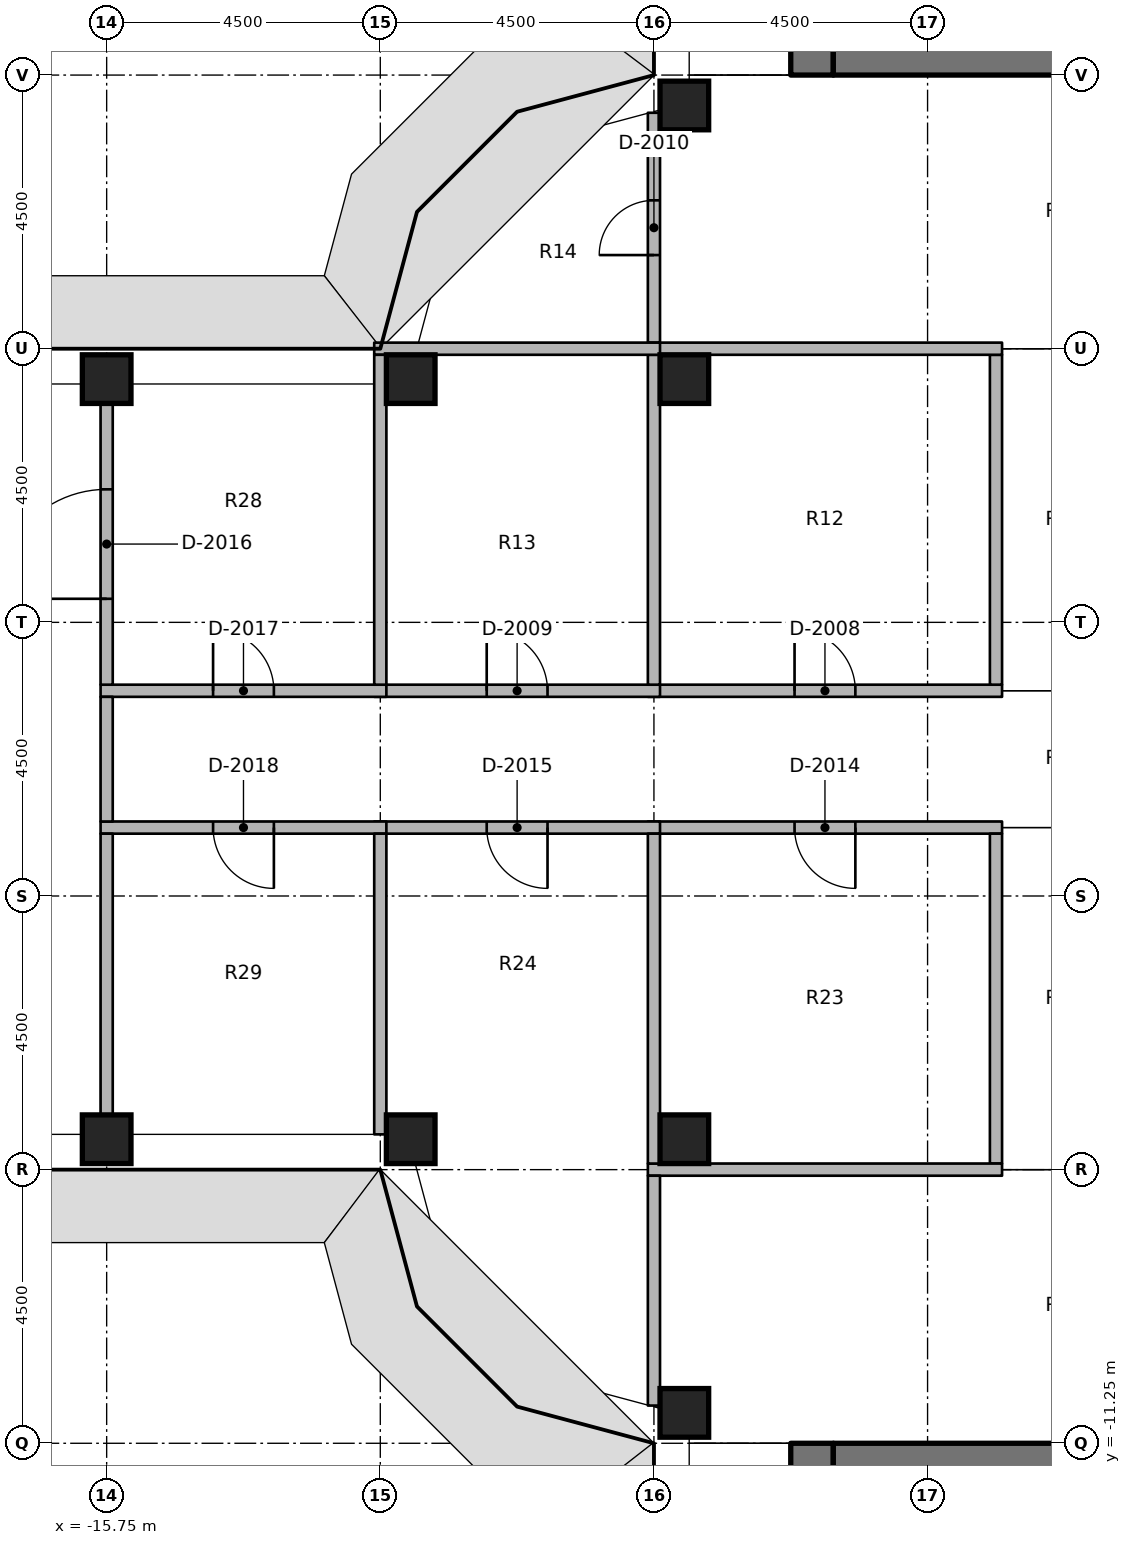
"""IFC4 building model, lengths in metres.
Left out: names, types, materials, properties, quantities, classifications, styles, units other than length and angle.
Written with IfcOpenShell. Run it as: python <this file> out.ifc"""

import sys

from ifc_helpers import new_model, si_unit, direction, frame, frame_2d, origin, origin_2d, place, context, subcontext, project, spatial, rectangle, extrude, element, fill, save


model = new_model("IFC4")
c1 = context("Model", 3, precision=1e-05, world=origin(), true_north=direction((0.0, 1.0)))
c2 = subcontext(c1, "Body", "Model", "MODEL_VIEW")
j1 = project(units=[si_unit("LENGTHUNIT", "METRE"), si_unit("PLANEANGLEUNIT", "RADIAN")], contexts=[c1])
p1 = place(None, origin())
s1 = spatial("IfcSite", under=j1, at=p1, CompositionType="ELEMENT")
p2 = place(p1, origin())
s2 = spatial("IfcBuilding", under=s1, at=p2, CompositionType="ELEMENT")
p3 = place(p2, frame((0.0, 0.0, 186.6)))
s3 = spatial("IfcBuildingStorey", under=s2, at=p3, CompositionType="ELEMENT", Elevation=186.6)
for number, where, z_axis, x_axis in (
    (1, (-15.75, -6.25, 0.0), (0.0, 0.0, 1.0), (1.0, 0.0, 0.0)),
    (2, (-15.75, 6.25, 0.0), (0.0, 0.0, 1.0), (1.0, 0.0, 0.0)),
    (3, (-10.75, -6.25, 0.0), (0.0, 0.0, 1.0), (1.0, 0.0, 0.0)),
    (4, (-10.75, 6.25, 0.0), (0.0, 0.0, 1.0), (1.0, 0.0, 0.0)),
    (5, (-6.25, -10.75, 0.0), (0.0, 0.0, 1.0), (1.0, 0.0, 0.0)),
    (6, (-6.25, -6.25, 0.0), (0.0, 0.0, 1.0), (1.0, 0.0, 0.0)),
    (7, (-6.25, 6.25, 0.0), (0.0, 0.0, 1.0), (1.0, 0.0, 0.0)),
    (8, (-6.25, 10.75, 0.0), (0.0, 0.0, 1.0), (1.0, 0.0, 0.0)),
):
    element("IfcColumn", number, at=place(p3, frame(where, z_axis=z_axis, x_axis=x_axis)), inside=s3, PredefinedType="COLUMN", context=c2, shape_type="SweptSolid", body=[
        extrude(rectangle(XDim=0.8, YDim=0.8, at=origin_2d()), origin(), (0.0, 0.0, 1.0), 3.65),
    ])
p4 = place(p3, frame((-4.15, 11.25, 0.0), z_axis=(0.0, 0.0, 1.0), x_axis=(0.0, 1.0, 0.0)))
e9 = element("IfcWall", 9, at=p4, inside=s3, PredefinedType="SHEAR", context=c2, shape_type="SweptSolid", body=[
    extrude(rectangle(XDim=15.0, YDim=0.7, at=frame_2d((7.5, 0.0))), origin(), (0.0, 0.0, 1.0), 3.8),
])
p5 = place(p4, frame((7.15, 0.0, 0.0)))
e10 = element("IfcOpeningElement", 10, at=p5, cuts=e9, PredefinedType="OPENING", context=c2, shape_type="SweptSolid", body=[
    extrude(rectangle(XDim=1.5, YDim=2.3, at=frame_2d((0.75, 1.15))), frame((0.0, 0.36, 0.0), z_axis=(0.0, -1.0, 0.0), x_axis=(1.0, 0.0, 0.0)), (0.0, 0.0, 1.0), 0.72),
])
p6 = place(p4, frame((13.9, 0.0, 0.0)))
e11 = element("IfcOpeningElement", 11, at=p6, cuts=e9, PredefinedType="OPENING", context=c2, shape_type="SweptSolid", body=[
    extrude(rectangle(XDim=0.9, YDim=2.1, at=frame_2d((0.45, 1.05))), frame((0.0, 0.36, 0.0), z_axis=(0.0, -1.0, 0.0), x_axis=(1.0, 0.0, 0.0)), (0.0, 0.0, 1.0), 0.72),
])
p7 = place(p4, frame((1.15, 0.0, 0.0)))
e12 = element("IfcOpeningElement", 12, at=p7, cuts=e9, PredefinedType="OPENING", context=c2, shape_type="SweptSolid", body=[
    extrude(rectangle(XDim=1.2, YDim=2.1, at=frame_2d((0.6, 1.05))), frame((0.0, 0.36, 0.0), z_axis=(0.0, -1.0, 0.0), x_axis=(1.0, 0.0, 0.0)), (0.0, 0.0, 1.0), 0.72),
])
p8 = place(p3, frame((-3.8, 11.6, 0.0), z_axis=(0.0, 0.0, 1.0), x_axis=(1.0, 0.0, 0.0)))
e13 = element("IfcWall", 13, at=p8, inside=s3, PredefinedType="SHEAR", context=c2, shape_type="SweptSolid", body=[
    extrude(rectangle(XDim=7.6, YDim=0.7, at=frame_2d((3.8, 0.0))), origin(), (0.0, 0.0, 1.0), 3.8),
])
p9 = place(p3, frame((-4.15, -11.25, 0.0), z_axis=(0.0, 0.0, 1.0), x_axis=(0.0, -1.0, 0.0)))
e14 = element("IfcWall", 14, at=p9, inside=s3, PredefinedType="SHEAR", context=c2, shape_type="SweptSolid", body=[
    extrude(rectangle(XDim=15.0, YDim=0.7, at=frame_2d((7.5, 0.0))), origin(), (0.0, 0.0, 1.0), 3.8),
])
p10 = place(p9, frame((7.15, 0.0, 0.0)))
e15 = element("IfcOpeningElement", 15, at=p10, cuts=e14, PredefinedType="OPENING", context=c2, shape_type="SweptSolid", body=[
    extrude(rectangle(XDim=1.5, YDim=2.3, at=frame_2d((0.75, 1.15))), frame((0.0, 0.36, 0.0), z_axis=(0.0, -1.0, 0.0), x_axis=(1.0, 0.0, 0.0)), (0.0, 0.0, 1.0), 0.72),
])
p11 = place(p9, frame((5.55, 0.0, 0.0)))
e16 = element("IfcOpeningElement", 16, at=p11, cuts=e14, PredefinedType="OPENING", context=c2, shape_type="SweptSolid", body=[
    extrude(rectangle(XDim=1.2, YDim=2.1, at=frame_2d((0.6, 1.05))), frame((0.0, 0.36, 0.0), z_axis=(0.0, -1.0, 0.0), x_axis=(1.0, 0.0, 0.0)), (0.0, 0.0, 1.0), 0.72),
])
p12 = place(p3, frame((-3.8, -11.6, 0.0), z_axis=(0.0, 0.0, 1.0), x_axis=(1.0, 0.0, 0.0)))
e17 = element("IfcWall", 17, at=p12, inside=s3, PredefinedType="SHEAR", context=c2, shape_type="SweptSolid", body=[
    extrude(rectangle(XDim=7.6, YDim=0.7, at=frame_2d((3.8, 0.0))), origin(), (0.0, 0.0, 1.0), 3.8),
])
p13 = place(p3, frame((-6.85, 1.125, 0.0), z_axis=(0.0, 0.0, 1.0), x_axis=(1.0, 0.0, 0.0)))
e18 = element("IfcWall", 18, at=p13, inside=s3, PredefinedType="PARTITIONING", context=c2, shape_type="SweptSolid", body=[
    extrude(rectangle(XDim=5.825, YDim=0.2, at=frame_2d((2.913, 0.0))), origin(), (0.0, 0.0, 1.0), 2.746),
])
p14 = place(p13, frame((2.413, 0.0, 0.0)))
e19 = element("IfcOpeningElement", 19, at=p14, cuts=e18, PredefinedType="OPENING", context=c2, shape_type="SweptSolid", body=[
    extrude(rectangle(XDim=1.0, YDim=2.1, at=frame_2d((0.5, 1.05))), frame((0.0, 0.11, 0.0), z_axis=(0.0, -1.0, 0.0), x_axis=(1.0, 0.0, 0.0)), (0.0, 0.0, 1.0), 0.22),
])
p15 = place(p3, frame((-11.35, 1.125, 0.0), z_axis=(0.0, 0.0, 1.0), x_axis=(1.0, 0.0, 0.0)))
e20 = element("IfcWall", 20, at=p15, inside=s3, PredefinedType="PARTITIONING", context=c2, shape_type="SweptSolid", body=[
    extrude(rectangle(XDim=4.7, YDim=0.2, at=frame_2d((2.35, 0.0))), origin(), (0.0, 0.0, 1.0), 2.746),
])
p16 = place(p15, frame((1.85, 0.0, 0.0)))
e21 = element("IfcOpeningElement", 21, at=p16, cuts=e20, PredefinedType="OPENING", context=c2, shape_type="SweptSolid", body=[
    extrude(rectangle(XDim=1.0, YDim=2.1, at=frame_2d((0.5, 1.05))), frame((0.0, 0.11, 0.0), z_axis=(0.0, -1.0, 0.0), x_axis=(1.0, 0.0, 0.0)), (0.0, 0.0, 1.0), 0.22),
])
p17 = place(p3, frame((-1.025, -1.125, 0.0), z_axis=(0.0, 0.0, 1.0), x_axis=(-1.0, 0.0, 0.0)))
e22 = element("IfcWall", 22, at=p17, inside=s3, PredefinedType="PARTITIONING", context=c2, shape_type="SweptSolid", body=[
    extrude(rectangle(XDim=5.825, YDim=0.2, at=frame_2d((2.913, 0.0))), origin(), (0.0, 0.0, 1.0), 2.746),
])
p18 = place(p17, frame((2.413, 0.0, 0.0)))
e23 = element("IfcOpeningElement", 23, at=p18, cuts=e22, PredefinedType="OPENING", context=c2, shape_type="SweptSolid", body=[
    extrude(rectangle(XDim=1.0, YDim=2.1, at=frame_2d((0.5, 1.05))), frame((0.0, 0.11, 0.0), z_axis=(0.0, -1.0, 0.0), x_axis=(1.0, 0.0, 0.0)), (0.0, 0.0, 1.0), 0.22),
])
p19 = place(p3, frame((-6.65, -1.125, 0.0), z_axis=(0.0, 0.0, 1.0), x_axis=(-1.0, 0.0, 0.0)))
e24 = element("IfcWall", 24, at=p19, inside=s3, PredefinedType="PARTITIONING", context=c2, shape_type="SweptSolid", body=[
    extrude(rectangle(XDim=4.7, YDim=0.2, at=frame_2d((2.35, 0.0))), origin(), (0.0, 0.0, 1.0), 2.746),
])
p20 = place(p19, frame((1.85, 0.0, 0.0)))
e25 = element("IfcOpeningElement", 25, at=p20, cuts=e24, PredefinedType="OPENING", context=c2, shape_type="SweptSolid", body=[
    extrude(rectangle(XDim=1.0, YDim=2.1, at=frame_2d((0.5, 1.05))), frame((0.0, 0.11, 0.0), z_axis=(0.0, -1.0, 0.0), x_axis=(1.0, 0.0, 0.0)), (0.0, 0.0, 1.0), 0.22),
])
p21 = place(p3, frame((-15.85, 1.125, 0.0), z_axis=(0.0, 0.0, 1.0), x_axis=(1.0, 0.0, 0.0)))
e26 = element("IfcWall", 26, at=p21, inside=s3, PredefinedType="PARTITIONING", context=c2, shape_type="SweptSolid", body=[
    extrude(rectangle(XDim=4.7, YDim=0.2, at=frame_2d((2.35, 0.0))), origin(), (0.0, 0.0, 1.0), 2.746),
])
p22 = place(p21, frame((1.85, 0.0, 0.0)))
e27 = element("IfcOpeningElement", 27, at=p22, cuts=e26, PredefinedType="OPENING", context=c2, shape_type="SweptSolid", body=[
    extrude(rectangle(XDim=1.0, YDim=2.1, at=frame_2d((0.5, 1.05))), frame((0.0, 0.11, 0.0), z_axis=(0.0, -1.0, 0.0), x_axis=(1.0, 0.0, 0.0)), (0.0, 0.0, 1.0), 0.22),
])
p23 = place(p3, frame((-11.15, -1.125, 0.0), z_axis=(0.0, 0.0, 1.0), x_axis=(-1.0, 0.0, 0.0)))
e28 = element("IfcWall", 28, at=p23, inside=s3, PredefinedType="PARTITIONING", context=c2, shape_type="SweptSolid", body=[
    extrude(rectangle(XDim=4.7, YDim=0.2, at=frame_2d((2.35, 0.0))), origin(), (0.0, 0.0, 1.0), 2.746),
])
p24 = place(p23, frame((1.85, 0.0, 0.0)))
e29 = element("IfcOpeningElement", 29, at=p24, cuts=e28, PredefinedType="OPENING", context=c2, shape_type="SweptSolid", body=[
    extrude(rectangle(XDim=1.0, YDim=2.1, at=frame_2d((0.5, 1.05))), frame((0.0, 0.11, 0.0), z_axis=(0.0, -1.0, 0.0), x_axis=(1.0, 0.0, 0.0)), (0.0, 0.0, 1.0), 0.22),
])
p25 = place(p3, frame((-15.75, -1.025, 0.0), z_axis=(0.0, 0.0, 1.0), x_axis=(0.0, 1.0, 0.0)))
e30 = element("IfcWall", 30, at=p25, inside=s3, PredefinedType="PARTITIONING", context=c2, shape_type="SweptSolid", body=[
    extrude(rectangle(XDim=2.05, YDim=0.2, at=frame_2d((1.025, 0.0))), origin(), (0.0, 0.0, 1.0), 2.746),
])
for number, where, z_axis, x_axis in (
    (31, (-1.125, 1.225, 0.0), (0.0, 0.0, 1.0), (0.0, 1.0, 0.0)),
    (32, (-1.125, -6.65, 0.0), (0.0, 0.0, 1.0), (0.0, 1.0, 0.0)),
):
    element("IfcWall", number, at=place(p3, frame(where, z_axis=z_axis, x_axis=x_axis)), inside=s3, PredefinedType="PARTITIONING", context=c2, shape_type="SweptSolid", body=[
        extrude(rectangle(XDim=5.425, YDim=0.2, at=frame_2d((2.712, 0.0))), origin(), (0.0, 0.0, 1.0), 2.746),
    ])
p26 = place(p3, frame((-6.85, 6.75, 0.0), z_axis=(0.0, 0.0, 1.0), x_axis=(1.0, 0.0, 0.0)))
e33 = element("IfcWall", 33, at=p26, inside=s3, PredefinedType="PARTITIONING", context=c2, shape_type="SweptSolid", body=[
    extrude(rectangle(XDim=5.825, YDim=0.2, at=frame_2d((2.913, 0.0))), origin(), (0.0, 0.0, 1.0), 2.746),
])
p27 = place(p3, frame((-6.75, 6.85, 0.0), z_axis=(0.0, 0.0, 1.0), x_axis=(0.0, 1.0, 0.0)))
e34 = element("IfcWall", 34, at=p27, inside=s3, PredefinedType="PARTITIONING", context=c2, shape_type="SweptSolid", body=[
    extrude(rectangle(XDim=3.78, YDim=0.2, at=frame_2d((1.89, 0.0))), origin(), (0.0, 0.0, 1.0), 2.746),
])
p28 = place(p27, frame((1.44, 0.0, 0.0)))
e35 = element("IfcOpeningElement", 35, at=p28, cuts=e34, PredefinedType="OPENING", context=c2, shape_type="SweptSolid", body=[
    extrude(rectangle(XDim=0.9, YDim=2.1, at=frame_2d((0.45, 1.05))), frame((0.0, 0.11, 0.0), z_axis=(0.0, -1.0, 0.0), x_axis=(1.0, 0.0, 0.0)), (0.0, 0.0, 1.0), 0.22),
])
p29 = place(p3, frame((-6.85, -6.75, 0.0), z_axis=(0.0, 0.0, 1.0), x_axis=(1.0, 0.0, 0.0)))
e36 = element("IfcWall", 36, at=p29, inside=s3, PredefinedType="PARTITIONING", context=c2, shape_type="SweptSolid", body=[
    extrude(rectangle(XDim=5.825, YDim=0.2, at=frame_2d((2.913, 0.0))), origin(), (0.0, 0.0, 1.0), 2.746),
])
p30 = place(p3, frame((-6.75, -10.63, 0.0), z_axis=(0.0, 0.0, 1.0), x_axis=(0.0, 1.0, 0.0)))
e37 = element("IfcWall", 37, at=p30, inside=s3, PredefinedType="PARTITIONING", context=c2, shape_type="SweptSolid", body=[
    extrude(rectangle(XDim=3.78, YDim=0.2, at=frame_2d((1.89, 0.0))), origin(), (0.0, 0.0, 1.0), 2.746),
])
p31 = place(p3, frame((-6.75, 1.225, 0.0), z_axis=(0.0, 0.0, 1.0), x_axis=(0.0, 1.0, 0.0)))
e38 = element("IfcWall", 38, at=p31, inside=s3, PredefinedType="PARTITIONING", context=c2, shape_type="SweptSolid", body=[
    extrude(rectangle(XDim=5.425, YDim=0.2, at=frame_2d((2.712, 0.0))), origin(), (0.0, 0.0, 1.0), 2.746),
])
p32 = place(p3, frame((-11.35, 6.75, 0.0), z_axis=(0.0, 0.0, 1.0), x_axis=(1.0, 0.0, 0.0)))
e39 = element("IfcWall", 39, at=p32, inside=s3, PredefinedType="PARTITIONING", context=c2, shape_type="SweptSolid", body=[
    extrude(rectangle(XDim=4.7, YDim=0.2, at=frame_2d((2.35, 0.0))), origin(), (0.0, 0.0, 1.0), 2.746),
])
for number, where, z_axis, x_axis in (
    (40, (-11.25, 1.225, 0.0), (0.0, 0.0, 1.0), (0.0, 1.0, 0.0)),
    (41, (-6.75, -6.65, 0.0), (0.0, 0.0, 1.0), (0.0, 1.0, 0.0)),
):
    element("IfcWall", number, at=place(p3, frame(where, z_axis=z_axis, x_axis=x_axis)), inside=s3, PredefinedType="PARTITIONING", context=c2, shape_type="SweptSolid", body=[
        extrude(rectangle(XDim=5.425, YDim=0.2, at=frame_2d((2.712, 0.0))), origin(), (0.0, 0.0, 1.0), 2.746),
    ])
p33 = place(p3, frame((-11.25, -6.17, 0.0), z_axis=(0.0, 0.0, 1.0), x_axis=(0.0, 1.0, 0.0)))
e42 = element("IfcWall", 42, at=p33, inside=s3, PredefinedType="PARTITIONING", context=c2, shape_type="SweptSolid", body=[
    extrude(rectangle(XDim=4.945, YDim=0.2, at=frame_2d((2.472, 0.0))), origin(), (0.0, 0.0, 1.0), 2.746),
])
p34 = place(p3, frame((-15.75, 1.225, 0.0), z_axis=(0.0, 0.0, 1.0), x_axis=(0.0, 1.0, 0.0)))
e43 = element("IfcWall", 43, at=p34, inside=s3, PredefinedType="PARTITIONING", context=c2, shape_type="SweptSolid", body=[
    extrude(rectangle(XDim=4.625, YDim=0.2, at=frame_2d((2.312, 0.0))), origin(), (0.0, 0.0, 1.0), 2.746),
])
p35 = place(p34, frame((1.413, 0.0, 0.0)))
e44 = element("IfcOpeningElement", 44, at=p35, cuts=e43, PredefinedType="OPENING", context=c2, shape_type="SweptSolid", body=[
    extrude(rectangle(XDim=1.8, YDim=2.1, at=frame_2d((0.9, 1.05))), frame((0.0, 0.11, 0.0), z_axis=(0.0, -1.0, 0.0), x_axis=(1.0, 0.0, 0.0)), (0.0, 0.0, 1.0), 0.22),
])
p36 = place(p3, frame((-15.75, -5.85, 0.0), z_axis=(0.0, 0.0, 1.0), x_axis=(0.0, 1.0, 0.0)))
e45 = element("IfcWall", 45, at=p36, inside=s3, PredefinedType="PARTITIONING", context=c2, shape_type="SweptSolid", body=[
    extrude(rectangle(XDim=4.625, YDim=0.2, at=frame_2d((2.312, 0.0))), origin(), (0.0, 0.0, 1.0), 2.746),
])
p37 = place(p14, origin())
e46 = element("IfcDoor", 46, at=p37, inside=s3, OperationType="SINGLE_SWING_RIGHT", PredefinedType="DOOR", context=c2, shape_type="SweptSolid", body=[
    extrude(rectangle(XDim=1.0, YDim=2.1, at=frame_2d((0.5, 1.05))), frame((0.0, 0.025, 0.0), z_axis=(0.0, -1.0, 0.0), x_axis=(1.0, 0.0, 0.0)), (0.0, 0.0, 1.0), 0.05),
])
fill(e19, e46)
p38 = place(p16, origin())
e47 = element("IfcDoor", 47, at=p38, inside=s3, OperationType="SINGLE_SWING_RIGHT", PredefinedType="DOOR", context=c2, shape_type="SweptSolid", body=[
    extrude(rectangle(XDim=1.0, YDim=2.1, at=frame_2d((0.5, 1.05))), frame((0.0, 0.025, 0.0), z_axis=(0.0, -1.0, 0.0), x_axis=(1.0, 0.0, 0.0)), (0.0, 0.0, 1.0), 0.05),
])
fill(e21, e47)
p39 = place(p28, origin())
e48 = element("IfcDoor", 48, at=p39, inside=s3, OperationType="SINGLE_SWING_LEFT", PredefinedType="DOOR", context=c2, shape_type="SweptSolid", body=[
    extrude(rectangle(XDim=0.9, YDim=2.1, at=frame_2d((0.45, 1.05))), frame((0.0, 0.025, 0.0), z_axis=(0.0, -1.0, 0.0), x_axis=(1.0, 0.0, 0.0)), (0.0, 0.0, 1.0), 0.05),
])
fill(e35, e48)
p40 = place(p18, origin())
e49 = element("IfcDoor", 49, at=p40, inside=s3, OperationType="SINGLE_SWING_RIGHT", PredefinedType="DOOR", context=c2, shape_type="SweptSolid", body=[
    extrude(rectangle(XDim=1.0, YDim=2.1, at=frame_2d((0.5, 1.05))), frame((0.0, 0.025, 0.0), z_axis=(0.0, -1.0, 0.0), x_axis=(1.0, 0.0, 0.0)), (0.0, 0.0, 1.0), 0.05),
])
fill(e23, e49)
p41 = place(p20, origin())
e50 = element("IfcDoor", 50, at=p41, inside=s3, OperationType="SINGLE_SWING_RIGHT", PredefinedType="DOOR", context=c2, shape_type="SweptSolid", body=[
    extrude(rectangle(XDim=1.0, YDim=2.1, at=frame_2d((0.5, 1.05))), frame((0.0, 0.025, 0.0), z_axis=(0.0, -1.0, 0.0), x_axis=(1.0, 0.0, 0.0)), (0.0, 0.0, 1.0), 0.05),
])
fill(e25, e50)
p42 = place(p35, origin())
e51 = element("IfcDoor", 51, at=p42, inside=s3, OperationType="DOUBLE_DOOR_SINGLE_SWING", PredefinedType="DOOR", context=c2, shape_type="SweptSolid", body=[
    extrude(rectangle(XDim=1.8, YDim=2.1, at=frame_2d((0.9, 1.05))), frame((0.0, 0.025, 0.0), z_axis=(0.0, -1.0, 0.0), x_axis=(1.0, 0.0, 0.0)), (0.0, 0.0, 1.0), 0.05),
])
fill(e44, e51)
p43 = place(p22, origin())
e52 = element("IfcDoor", 52, at=p43, inside=s3, OperationType="SINGLE_SWING_RIGHT", PredefinedType="DOOR", context=c2, shape_type="SweptSolid", body=[
    extrude(rectangle(XDim=1.0, YDim=2.1, at=frame_2d((0.5, 1.05))), frame((0.0, 0.025, 0.0), z_axis=(0.0, -1.0, 0.0), x_axis=(1.0, 0.0, 0.0)), (0.0, 0.0, 1.0), 0.05),
])
fill(e27, e52)
p44 = place(p24, origin())
e53 = element("IfcDoor", 53, at=p44, inside=s3, OperationType="SINGLE_SWING_RIGHT", PredefinedType="DOOR", context=c2, shape_type="SweptSolid", body=[
    extrude(rectangle(XDim=1.0, YDim=2.1, at=frame_2d((0.5, 1.05))), frame((0.0, 0.025, 0.0), z_axis=(0.0, -1.0, 0.0), x_axis=(1.0, 0.0, 0.0)), (0.0, 0.0, 1.0), 0.05),
])
fill(e29, e53)
save(model, sys.argv[1])
